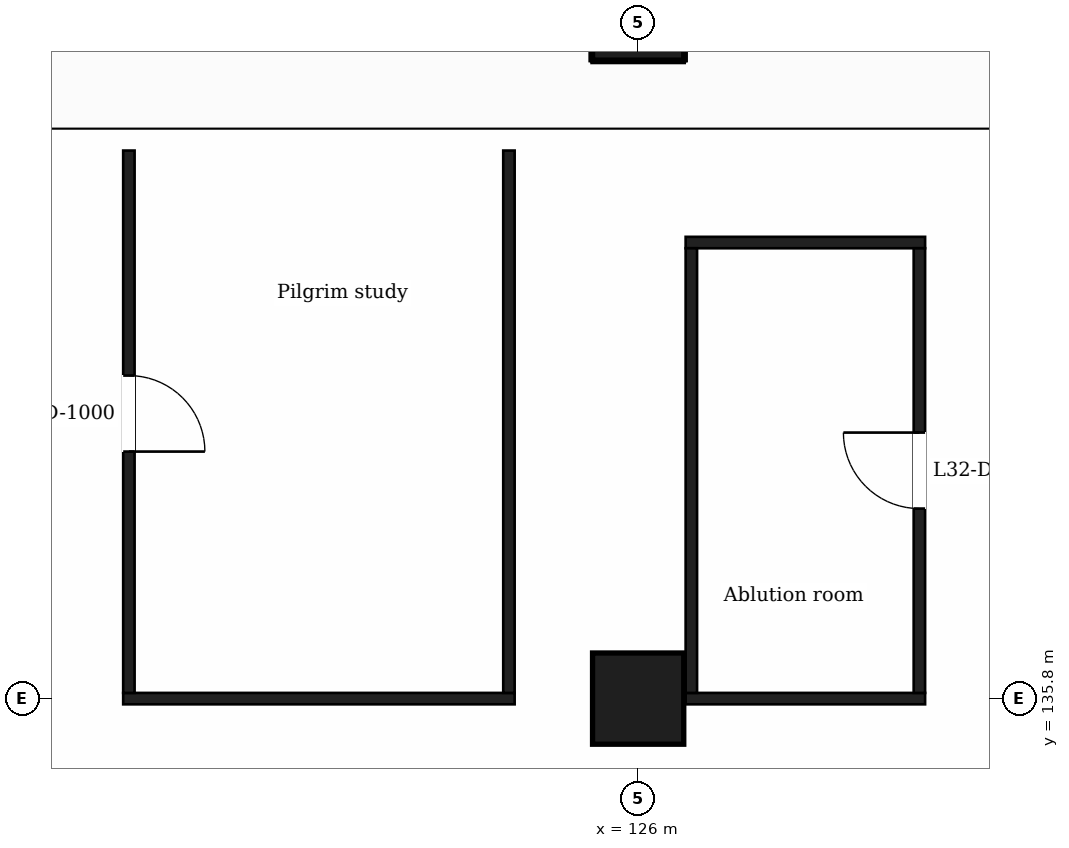
"""IFC4 building model, lengths in metres.
Left out: names, types, materials, properties, quantities, classifications, styles, units other than length and angle.
Written with IfcOpenShell. Run it as: python <this file> out.ifc"""

import sys

from ifc_helpers import new_model, si_unit, direction, frame, frame_2d, origin, origin_2d, place, context, subcontext, project, spatial, rectangle, extrude, element, fill, save


model = new_model("IFC4")
c1 = context("Model", 3, precision=1e-05, world=origin(), true_north=direction((0.0, 1.0)))
c2 = subcontext(c1, "Body", "Model", "MODEL_VIEW")
j1 = project(units=[si_unit("LENGTHUNIT", "METRE"), si_unit("PLANEANGLEUNIT", "RADIAN")], contexts=[c1])
p1 = place(None, origin())
s1 = spatial("IfcSite", under=j1, at=p1, CompositionType="ELEMENT")
p2 = place(p1, origin())
s2 = spatial("IfcBuilding", under=s1, at=p2, CompositionType="ELEMENT")
p3 = place(p2, frame((0.0, 0.0, 135.4)))
s3 = spatial("IfcBuildingStorey", under=s2, at=p3, CompositionType="ELEMENT", Elevation=135.4)
for number, where, z_axis, x_axis in (
    (1, (126.0, 135.8, 0.0), (0.0, 0.0, 1.0), (1.0, 0.0, 0.0)),
    (2, (126.0, 144.8, 0.0), (0.0, 0.0, 1.0), (1.0, 0.0, 0.0)),
):
    element("IfcColumn", number, at=place(p3, frame(where, z_axis=z_axis, x_axis=x_axis)), inside=s3, PredefinedType="COLUMN", context=c2, shape_type="SweptSolid", body=[
        extrude(rectangle(XDim=1.2, YDim=1.2, at=origin_2d()), origin(), (0.0, 0.0, 1.0), 7.4),
    ])
p4 = place(p3, frame((119.225, 135.8, 0.0), z_axis=(0.0, 0.0, 1.0), x_axis=(1.0, 0.0, 0.0)))
e3 = element("IfcWall", 3, at=p4, inside=s3, PredefinedType="PARTITIONING", context=c2, shape_type="SweptSolid", body=[
    extrude(rectangle(XDim=5.15, YDim=0.15, at=frame_2d((2.575, 0.0))), origin(), (0.0, 0.0, 1.0), 6.9),
])
for number, where, z_axis, x_axis in (
    (4, (126.625, 135.8, 0.0), (0.0, 0.0, 1.0), (1.0, 0.0, 0.0)),
    (5, (126.625, 141.8, 0.0), (0.0, 0.0, 1.0), (1.0, 0.0, 0.0)),
):
    element("IfcWall", number, at=place(p3, frame(where, z_axis=z_axis, x_axis=x_axis)), inside=s3, PredefinedType="PARTITIONING", context=c2, shape_type="SweptSolid", body=[
        extrude(rectangle(XDim=3.15, YDim=0.15, at=frame_2d((1.575, 0.0))), origin(), (0.0, 0.0, 1.0), 6.9),
    ])
p5 = place(p3, frame((119.3, 135.875, 0.0), z_axis=(0.0, 0.0, 1.0), x_axis=(0.0, 1.0, 0.0)))
e6 = element("IfcWall", 6, at=p5, inside=s3, PredefinedType="PARTITIONING", context=c2, shape_type="SweptSolid", body=[
    extrude(rectangle(XDim=7.135, YDim=0.15, at=frame_2d((3.567, 0.0))), origin(), (0.0, 0.0, 1.0), 6.9),
])
p6 = place(p5, frame((3.175, 0.0, 0.0)))
e7 = element("IfcOpeningElement", 7, at=p6, cuts=e6, PredefinedType="OPENING", context=c2, shape_type="SweptSolid", body=[
    extrude(rectangle(XDim=1.0, YDim=2.1, at=frame_2d((0.5, 1.05))), frame((0.0, 0.085, 0.0), z_axis=(0.0, -1.0, 0.0), x_axis=(1.0, 0.0, 0.0)), (0.0, 0.0, 1.0), 0.17),
])
p7 = place(p3, frame((124.3, 135.875, 0.0), z_axis=(0.0, 0.0, 1.0), x_axis=(0.0, 1.0, 0.0)))
e8 = element("IfcWall", 8, at=p7, inside=s3, PredefinedType="PARTITIONING", context=c2, shape_type="SweptSolid", body=[
    extrude(rectangle(XDim=7.135, YDim=0.15, at=frame_2d((3.567, 0.0))), origin(), (0.0, 0.0, 1.0), 6.9),
])
p8 = place(p3, frame((126.7, 135.875, 0.0), z_axis=(0.0, 0.0, 1.0), x_axis=(0.0, 1.0, 0.0)))
e9 = element("IfcWall", 9, at=p8, inside=s3, PredefinedType="PARTITIONING", context=c2, shape_type="SweptSolid", body=[
    extrude(rectangle(XDim=5.85, YDim=0.15, at=frame_2d((2.925, 0.0))), origin(), (0.0, 0.0, 1.0), 6.9),
])
p9 = place(p3, frame((129.7, 135.875, 0.0), z_axis=(0.0, 0.0, 1.0), x_axis=(0.0, 1.0, 0.0)))
e10 = element("IfcWall", 10, at=p9, inside=s3, PredefinedType="PARTITIONING", context=c2, shape_type="SweptSolid", body=[
    extrude(rectangle(XDim=5.85, YDim=0.15, at=frame_2d((2.925, 0.0))), origin(), (0.0, 0.0, 1.0), 6.9),
])
p10 = place(p9, frame((2.425, 0.0, 0.0)))
e11 = element("IfcOpeningElement", 11, at=p10, cuts=e10, PredefinedType="OPENING", context=c2, shape_type="SweptSolid", body=[
    extrude(rectangle(XDim=1.0, YDim=2.1, at=frame_2d((0.5, 1.05))), frame((0.0, 0.085, 0.0), z_axis=(0.0, -1.0, 0.0), x_axis=(1.0, 0.0, 0.0)), (0.0, 0.0, 1.0), 0.17),
])
p11 = place(p10, origin())
e12 = element("IfcDoor", 12, at=p11, inside=s3, OperationType="SINGLE_SWING_RIGHT", PredefinedType="DOOR", context=c2, shape_type="SweptSolid", body=[
    extrude(rectangle(XDim=1.0, YDim=2.1, at=frame_2d((0.5, 1.05))), frame((0.0, 0.025, 0.0), z_axis=(0.0, -1.0, 0.0), x_axis=(1.0, 0.0, 0.0)), (0.0, 0.0, 1.0), 0.05),
])
fill(e11, e12)
p12 = place(p6, origin())
e13 = element("IfcDoor", 13, at=p12, inside=s3, OperationType="SINGLE_SWING_LEFT", PredefinedType="DOOR", context=c2, shape_type="SweptSolid", body=[
    extrude(rectangle(XDim=1.0, YDim=2.1, at=frame_2d((0.5, 1.05))), frame((0.0, 0.025, 0.0), z_axis=(0.0, -1.0, 0.0), x_axis=(1.0, 0.0, 0.0)), (0.0, 0.0, 1.0), 0.05),
])
fill(e7, e13)
save(model, sys.argv[1])
